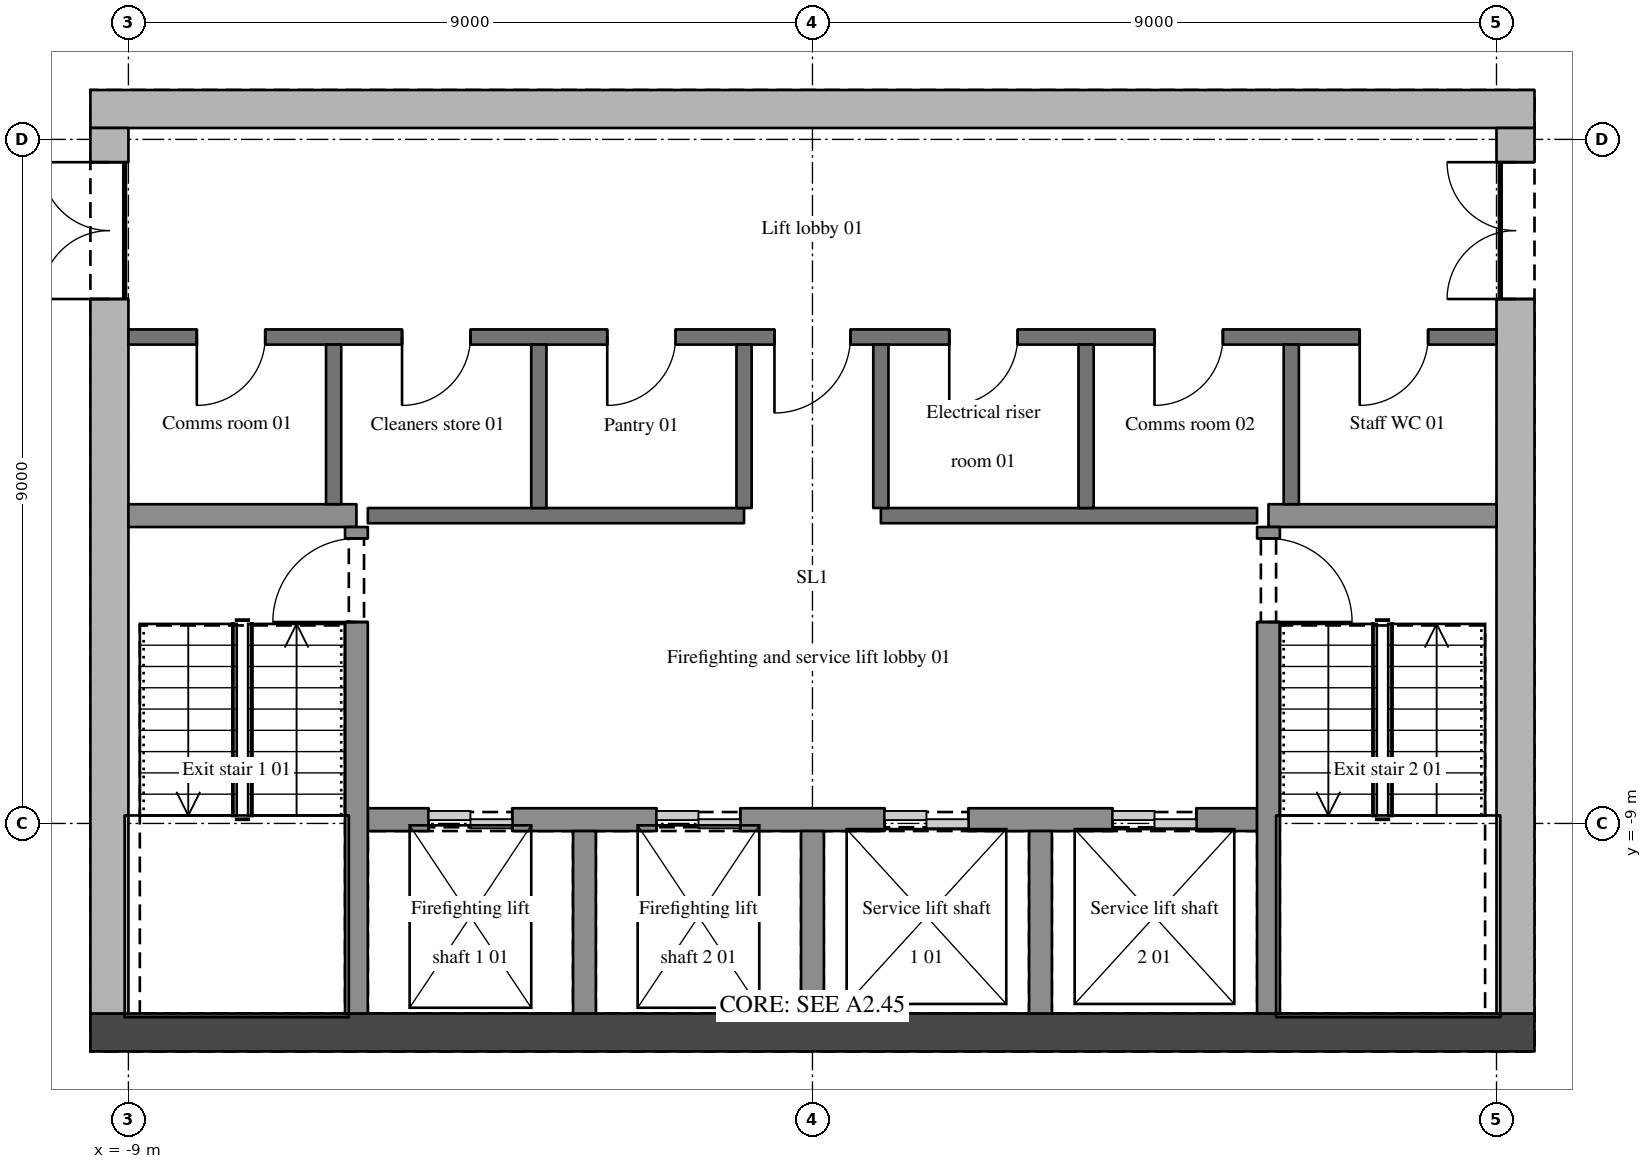
"""IFC4 building model, lengths in metres.
Left out: names, types, materials, properties, quantities, classifications, styles, units other than length and angle.
Written with IfcOpenShell. Run it as: python <this file> out.ifc"""

import sys

from ifc_helpers import new_model, si_unit, direction, frame, frame_2d, origin, place, context, subcontext, project, spatial, polyline, rectangle, outline, extrude, element, fill, save


model = new_model("IFC4")
c1 = context("Model", 3, precision=1e-05, world=origin(), true_north=direction((0.0, 1.0)))
c2 = subcontext(c1, "Body", "Model", "MODEL_VIEW")
j1 = project(units=[si_unit("LENGTHUNIT", "METRE"), si_unit("PLANEANGLEUNIT", "RADIAN")], contexts=[c1])
p1 = place(None, origin())
s1 = spatial("IfcSite", under=j1, at=p1, CompositionType="ELEMENT")
p2 = place(p1, origin())
s2 = spatial("IfcBuilding", under=s1, at=p2, CompositionType="ELEMENT")
p3 = place(p2, frame((0.0, 0.0, 300.9)))
s3 = spatial("IfcBuildingStorey", under=s2, at=p3, CompositionType="ELEMENT", Elevation=300.9)
for number, where, z_axis, x_axis in (
    (1, (-9.5, -11.75, 0.0), (0.0, 0.0, 1.0), (1.0, 0.0, 0.0)),
    (2, (-9.5, 0.4, 0.0), (0.0, 0.0, 1.0), (1.0, 0.0, 0.0)),
):
    element("IfcWall", number, at=place(p3, frame(where, z_axis=z_axis, x_axis=x_axis)), inside=s3, PredefinedType="SHEAR", context=c2, shape_type="SweptSolid", body=[
        extrude(outline(polyline([(0.0, 0.0), (19.0, 0.0), (19.0, 3.6), (0.0, 3.6), (0.0, 0.0)])), frame((0.0, 0.25, 0.0), z_axis=(0.0, -1.0, 0.0), x_axis=(1.0, 0.0, 0.0)), (0.0, 0.0, 1.0), 0.5),
    ])
p4 = place(p3, frame((-9.25, -11.5, 0.0), z_axis=(0.0, 0.0, 1.0), x_axis=(0.0, 1.0, 0.0)))
e3 = element("IfcWall", 3, at=p4, inside=s3, PredefinedType="SHEAR", context=c2, shape_type="SweptSolid", body=[
    extrude(outline(polyline([(0.0, 0.0), (11.65, 0.0), (11.65, 3.6), (0.0, 3.6), (0.0, 0.0)])), frame((0.0, 0.25, 0.0), z_axis=(0.0, -1.0, 0.0), x_axis=(1.0, 0.0, 0.0)), (0.0, 0.0, 1.0), 0.5),
])
p5 = place(p4, frame((9.4, 0.0, 0.0)))
e4 = element("IfcOpeningElement", 4, at=p5, cuts=e3, PredefinedType="OPENING", context=c2, shape_type="SweptSolid", body=[
    extrude(rectangle(XDim=1.8, YDim=2.1, at=frame_2d((0.9, 1.05))), frame((0.0, 0.26, 0.0), z_axis=(0.0, -1.0, 0.0), x_axis=(1.0, 0.0, 0.0)), (0.0, 0.0, 1.0), 0.52),
])
p6 = place(p3, frame((9.25, -11.5, 0.0), z_axis=(0.0, 0.0, 1.0), x_axis=(0.0, 1.0, 0.0)))
e5 = element("IfcWall", 5, at=p6, inside=s3, PredefinedType="SHEAR", context=c2, shape_type="SweptSolid", body=[
    extrude(outline(polyline([(0.0, 0.0), (11.65, 0.0), (11.65, 3.6), (0.0, 3.6), (0.0, 0.0)])), frame((0.0, 0.25, 0.0), z_axis=(0.0, -1.0, 0.0), x_axis=(1.0, 0.0, 0.0)), (0.0, 0.0, 1.0), 0.5),
])
p7 = place(p6, frame((9.4, 0.0, 0.0)))
e6 = element("IfcOpeningElement", 6, at=p7, cuts=e5, PredefinedType="OPENING", context=c2, shape_type="SweptSolid", body=[
    extrude(rectangle(XDim=1.8, YDim=2.1, at=frame_2d((0.9, 1.05))), frame((0.0, 0.26, 0.0), z_axis=(0.0, -1.0, 0.0), x_axis=(1.0, 0.0, 0.0)), (0.0, 0.0, 1.0), 0.52),
])
p8 = place(p3, frame((-5.85, -8.95, 0.0), z_axis=(0.0, 0.0, 1.0), x_axis=(1.0, 0.0, 0.0)))
e7 = element("IfcWall", 7, at=p8, inside=s3, PredefinedType="SHEAR", context=c2, shape_type="SweptSolid", body=[
    extrude(rectangle(XDim=11.7, YDim=0.3, at=frame_2d((5.85, 0.0))), origin(), (0.0, 0.0, 1.0), 3.6),
])
p9 = place(p8, frame((0.8, 0.0, 0.0)))
e8 = element("IfcOpeningElement", 8, at=p9, cuts=e7, PredefinedType="OPENING", context=c2, shape_type="SweptSolid", body=[
    extrude(rectangle(XDim=1.1, YDim=2.1, at=frame_2d((0.55, 1.05))), frame((0.0, 0.16, 0.0), z_axis=(0.0, -1.0, 0.0), x_axis=(1.0, 0.0, 0.0)), (0.0, 0.0, 1.0), 0.32),
])
p10 = place(p8, frame((3.8, 0.0, 0.0)))
e9 = element("IfcOpeningElement", 9, at=p10, cuts=e7, PredefinedType="OPENING", context=c2, shape_type="SweptSolid", body=[
    extrude(rectangle(XDim=1.1, YDim=2.1, at=frame_2d((0.55, 1.05))), frame((0.0, 0.16, 0.0), z_axis=(0.0, -1.0, 0.0), x_axis=(1.0, 0.0, 0.0)), (0.0, 0.0, 1.0), 0.32),
])
p11 = place(p8, frame((6.8, 0.0, 0.0)))
e10 = element("IfcOpeningElement", 10, at=p11, cuts=e7, PredefinedType="OPENING", context=c2, shape_type="SweptSolid", body=[
    extrude(rectangle(XDim=1.1, YDim=2.1, at=frame_2d((0.55, 1.05))), frame((0.0, 0.16, 0.0), z_axis=(0.0, -1.0, 0.0), x_axis=(1.0, 0.0, 0.0)), (0.0, 0.0, 1.0), 0.32),
])
p12 = place(p8, frame((9.8, 0.0, 0.0)))
e11 = element("IfcOpeningElement", 11, at=p12, cuts=e7, PredefinedType="OPENING", context=c2, shape_type="SweptSolid", body=[
    extrude(rectangle(XDim=1.1, YDim=2.1, at=frame_2d((0.55, 1.05))), frame((0.0, 0.16, 0.0), z_axis=(0.0, -1.0, 0.0), x_axis=(1.0, 0.0, 0.0)), (0.0, 0.0, 1.0), 0.32),
])
p13 = place(p3, frame((-9.0, -4.95, 0.0), z_axis=(0.0, 0.0, 1.0), x_axis=(1.0, 0.0, 0.0)))
e12 = element("IfcWall", 12, at=p13, inside=s3, PredefinedType="SHEAR", context=c2, shape_type="SweptSolid", body=[
    extrude(rectangle(XDim=3.0, YDim=0.3, at=frame_2d((1.5, 0.0))), origin(), (0.0, 0.0, 1.0), 3.6),
])
for number, where, z_axis, x_axis in (
    (13, (-5.85, -4.95, 0.0), (0.0, 0.0, 1.0), (1.0, 0.0, 0.0)),
    (14, (0.9, -4.95, 0.0), (0.0, 0.0, 1.0), (1.0, 0.0, 0.0)),
):
    element("IfcWall", number, at=place(p3, frame(where, z_axis=z_axis, x_axis=x_axis)), inside=s3, PredefinedType="SOLIDWALL", context=c2, shape_type="SweptSolid", body=[
        extrude(rectangle(XDim=4.95, YDim=0.2, at=frame_2d((2.475, 0.0))), origin(), (0.0, 0.0, 1.0), 3.3),
    ])
p14 = place(p3, frame((6.0, -4.95, 0.0), z_axis=(0.0, 0.0, 1.0), x_axis=(1.0, 0.0, 0.0)))
e15 = element("IfcWall", 15, at=p14, inside=s3, PredefinedType="SHEAR", context=c2, shape_type="SweptSolid", body=[
    extrude(rectangle(XDim=3.0, YDim=0.3, at=frame_2d((1.5, 0.0))), origin(), (0.0, 0.0, 1.0), 3.6),
])
p15 = place(p3, frame((9.0, -2.6, 0.0), z_axis=(0.0, 0.0, 1.0), x_axis=(-1.0, 0.0, 0.0)))
e16 = element("IfcWall", 16, at=p15, inside=s3, PredefinedType="SOLIDWALL", context=c2, shape_type="SweptSolid", body=[
    extrude(rectangle(XDim=18.0, YDim=0.2, at=frame_2d((9.0, 0.0))), origin(), (0.0, 0.0, 1.0), 3.3),
])
p16 = place(p15, frame((8.5, 0.0, 0.0)))
e17 = element("IfcOpeningElement", 17, at=p16, cuts=e16, PredefinedType="OPENING", context=c2, shape_type="SweptSolid", body=[
    extrude(rectangle(XDim=1.0, YDim=2.1, at=frame_2d((0.5, 1.05))), frame((0.0, 0.11, 0.0), z_axis=(0.0, -1.0, 0.0), x_axis=(1.0, 0.0, 0.0)), (0.0, 0.0, 1.0), 0.22),
])
p17 = place(p15, frame((16.2, 0.0, 0.0)))
e18 = element("IfcOpeningElement", 18, at=p17, cuts=e16, PredefinedType="OPENING", context=c2, shape_type="SweptSolid", body=[
    extrude(rectangle(XDim=0.9, YDim=2.1, at=frame_2d((0.45, 1.05))), frame((0.0, 0.11, 0.0), z_axis=(0.0, -1.0, 0.0), x_axis=(1.0, 0.0, 0.0)), (0.0, 0.0, 1.0), 0.22),
])
p18 = place(p15, frame((13.5, 0.0, 0.0)))
e19 = element("IfcOpeningElement", 19, at=p18, cuts=e16, PredefinedType="OPENING", context=c2, shape_type="SweptSolid", body=[
    extrude(rectangle(XDim=0.9, YDim=2.1, at=frame_2d((0.45, 1.05))), frame((0.0, 0.11, 0.0), z_axis=(0.0, -1.0, 0.0), x_axis=(1.0, 0.0, 0.0)), (0.0, 0.0, 1.0), 0.22),
])
p19 = place(p15, frame((10.8, 0.0, 0.0)))
e20 = element("IfcOpeningElement", 20, at=p19, cuts=e16, PredefinedType="OPENING", context=c2, shape_type="SweptSolid", body=[
    extrude(rectangle(XDim=0.9, YDim=2.1, at=frame_2d((0.45, 1.05))), frame((0.0, 0.11, 0.0), z_axis=(0.0, -1.0, 0.0), x_axis=(1.0, 0.0, 0.0)), (0.0, 0.0, 1.0), 0.22),
])
p20 = place(p15, frame((6.3, 0.0, 0.0)))
e21 = element("IfcOpeningElement", 21, at=p20, cuts=e16, PredefinedType="OPENING", context=c2, shape_type="SweptSolid", body=[
    extrude(rectangle(XDim=0.9, YDim=2.1, at=frame_2d((0.45, 1.05))), frame((0.0, 0.11, 0.0), z_axis=(0.0, -1.0, 0.0), x_axis=(1.0, 0.0, 0.0)), (0.0, 0.0, 1.0), 0.22),
])
p21 = place(p15, frame((3.6, 0.0, 0.0)))
e22 = element("IfcOpeningElement", 22, at=p21, cuts=e16, PredefinedType="OPENING", context=c2, shape_type="SweptSolid", body=[
    extrude(rectangle(XDim=0.9, YDim=2.1, at=frame_2d((0.45, 1.05))), frame((0.0, 0.11, 0.0), z_axis=(0.0, -1.0, 0.0), x_axis=(1.0, 0.0, 0.0)), (0.0, 0.0, 1.0), 0.22),
])
p22 = place(p15, frame((0.9, 0.0, 0.0)))
e23 = element("IfcOpeningElement", 23, at=p22, cuts=e16, PredefinedType="OPENING", context=c2, shape_type="SweptSolid", body=[
    extrude(rectangle(XDim=0.9, YDim=2.1, at=frame_2d((0.45, 1.05))), frame((0.0, 0.11, 0.0), z_axis=(0.0, -1.0, 0.0), x_axis=(1.0, 0.0, 0.0)), (0.0, 0.0, 1.0), 0.22),
])
p23 = place(p3, frame((-6.3, -4.8, 0.0), z_axis=(0.0, 0.0, 1.0), x_axis=(0.0, 1.0, 0.0)))
e24 = element("IfcWall", 24, at=p23, inside=s3, PredefinedType="SOLIDWALL", context=c2, shape_type="SweptSolid", body=[
    extrude(rectangle(XDim=2.1, YDim=0.2, at=frame_2d((1.05, 0.0))), origin(), (0.0, 0.0, 1.0), 3.3),
])
p24 = place(p3, frame((-6.0, -11.5, 0.0), z_axis=(0.0, 0.0, 1.0), x_axis=(0.0, 1.0, 0.0)))
e25 = element("IfcWall", 25, at=p24, inside=s3, PredefinedType="SHEAR", context=c2, shape_type="SweptSolid", body=[
    extrude(rectangle(XDim=6.4, YDim=0.3, at=frame_2d((3.2, 0.0))), origin(), (0.0, 0.0, 1.0), 3.6),
])
p25 = place(p24, frame((5.15, 0.0, 0.0)))
e26 = element("IfcOpeningElement", 26, at=p25, cuts=e25, PredefinedType="OPENING", context=c2, shape_type="SweptSolid", body=[
    extrude(rectangle(XDim=1.1, YDim=2.1, at=frame_2d((0.55, 1.05))), frame((0.0, 0.16, 0.0), z_axis=(0.0, -1.0, 0.0), x_axis=(1.0, 0.0, 0.0)), (0.0, 0.0, 1.0), 0.32),
])
p26 = place(p3, frame((-3.6, -4.85, 0.0), z_axis=(0.0, 0.0, 1.0), x_axis=(0.0, 1.0, 0.0)))
e27 = element("IfcWall", 27, at=p26, inside=s3, PredefinedType="SOLIDWALL", context=c2, shape_type="SweptSolid", body=[
    extrude(rectangle(XDim=2.15, YDim=0.2, at=frame_2d((1.075, 0.0))), origin(), (0.0, 0.0, 1.0), 3.3),
])
p27 = place(p3, frame((-3.0, -11.5, 0.0), z_axis=(0.0, 0.0, 1.0), x_axis=(0.0, 1.0, 0.0)))
e28 = element("IfcWall", 28, at=p27, inside=s3, PredefinedType="SHEAR", context=c2, shape_type="SweptSolid", body=[
    extrude(rectangle(XDim=2.4, YDim=0.3, at=frame_2d((1.2, 0.0))), origin(), (0.0, 0.0, 1.0), 3.6),
])
p28 = place(p3, frame((-0.9, -4.85, 0.0), z_axis=(0.0, 0.0, 1.0), x_axis=(0.0, 1.0, 0.0)))
e29 = element("IfcWall", 29, at=p28, inside=s3, PredefinedType="SOLIDWALL", context=c2, shape_type="SweptSolid", body=[
    extrude(rectangle(XDim=2.15, YDim=0.2, at=frame_2d((1.075, 0.0))), origin(), (0.0, 0.0, 1.0), 3.3),
])
p29 = place(p3, frame((0.0, -11.5, 0.0), z_axis=(0.0, 0.0, 1.0), x_axis=(0.0, 1.0, 0.0)))
e30 = element("IfcWall", 30, at=p29, inside=s3, PredefinedType="SHEAR", context=c2, shape_type="SweptSolid", body=[
    extrude(rectangle(XDim=2.4, YDim=0.3, at=frame_2d((1.2, 0.0))), origin(), (0.0, 0.0, 1.0), 3.6),
])
p30 = place(p3, frame((0.9, -4.85, 0.0), z_axis=(0.0, 0.0, 1.0), x_axis=(0.0, 1.0, 0.0)))
e31 = element("IfcWall", 31, at=p30, inside=s3, PredefinedType="SOLIDWALL", context=c2, shape_type="SweptSolid", body=[
    extrude(rectangle(XDim=2.15, YDim=0.2, at=frame_2d((1.075, 0.0))), origin(), (0.0, 0.0, 1.0), 3.3),
])
p31 = place(p3, frame((3.0, -11.5, 0.0), z_axis=(0.0, 0.0, 1.0), x_axis=(0.0, 1.0, 0.0)))
e32 = element("IfcWall", 32, at=p31, inside=s3, PredefinedType="SHEAR", context=c2, shape_type="SweptSolid", body=[
    extrude(rectangle(XDim=2.4, YDim=0.3, at=frame_2d((1.2, 0.0))), origin(), (0.0, 0.0, 1.0), 3.6),
])
p32 = place(p3, frame((3.6, -4.85, 0.0), z_axis=(0.0, 0.0, 1.0), x_axis=(0.0, 1.0, 0.0)))
e33 = element("IfcWall", 33, at=p32, inside=s3, PredefinedType="SOLIDWALL", context=c2, shape_type="SweptSolid", body=[
    extrude(rectangle(XDim=2.15, YDim=0.2, at=frame_2d((1.075, 0.0))), origin(), (0.0, 0.0, 1.0), 3.3),
])
p33 = place(p3, frame((6.0, -5.1, 0.0), z_axis=(0.0, 0.0, 1.0), x_axis=(0.0, -1.0, 0.0)))
e34 = element("IfcWall", 34, at=p33, inside=s3, PredefinedType="SHEAR", context=c2, shape_type="SweptSolid", body=[
    extrude(rectangle(XDim=6.4, YDim=0.3, at=frame_2d((3.2, 0.0))), origin(), (0.0, 0.0, 1.0), 3.6),
])
p34 = place(p33, frame((0.15, 0.0, 0.0)))
e35 = element("IfcOpeningElement", 35, at=p34, cuts=e34, PredefinedType="OPENING", context=c2, shape_type="SweptSolid", body=[
    extrude(rectangle(XDim=1.1, YDim=2.1, at=frame_2d((0.55, 1.05))), frame((0.0, 0.16, 0.0), z_axis=(0.0, -1.0, 0.0), x_axis=(1.0, 0.0, 0.0)), (0.0, 0.0, 1.0), 0.32),
])
p35 = place(p3, frame((6.3, -4.8, 0.0), z_axis=(0.0, 0.0, 1.0), x_axis=(0.0, 1.0, 0.0)))
e36 = element("IfcWall", 36, at=p35, inside=s3, PredefinedType="SOLIDWALL", context=c2, shape_type="SweptSolid", body=[
    extrude(rectangle(XDim=2.1, YDim=0.2, at=frame_2d((1.05, 0.0))), origin(), (0.0, 0.0, 1.0), 3.3),
])
p36 = place(p5, origin())
e37 = element("IfcDoor", 37, at=p36, inside=s3, OperationType="DOUBLE_DOOR_SINGLE_SWING", PredefinedType="DOOR", context=c2, shape_type="SweptSolid", body=[
    extrude(rectangle(XDim=1.8, YDim=2.1, at=frame_2d((0.9, 1.05))), frame((0.0, 0.025, 0.0), z_axis=(0.0, -1.0, 0.0), x_axis=(1.0, 0.0, 0.0)), (0.0, 0.0, 1.0), 0.05),
])
fill(e4, e37)
p37 = place(p7, origin())
e38 = element("IfcDoor", 38, at=p37, inside=s3, OperationType="DOUBLE_DOOR_SINGLE_SWING", PredefinedType="DOOR", context=c2, shape_type="SweptSolid", body=[
    extrude(rectangle(XDim=1.8, YDim=2.1, at=frame_2d((0.9, 1.05))), frame((0.0, 0.025, 0.0), z_axis=(0.0, -1.0, 0.0), x_axis=(1.0, 0.0, 0.0)), (0.0, 0.0, 1.0), 0.05),
])
fill(e6, e38)
p38 = place(p16, origin())
e39 = element("IfcDoor", 39, at=p38, inside=s3, OperationType="SINGLE_SWING_RIGHT", PredefinedType="DOOR", context=c2, shape_type="SweptSolid", body=[
    extrude(rectangle(XDim=1.0, YDim=2.1, at=frame_2d((0.5, 1.05))), frame((0.0, 0.025, 0.0), z_axis=(0.0, -1.0, 0.0), x_axis=(1.0, 0.0, 0.0)), (0.0, 0.0, 1.0), 0.05),
])
fill(e17, e39)
p39 = place(p25, origin())
e40 = element("IfcDoor", 40, at=p39, inside=s3, OperationType="SINGLE_SWING_LEFT", PredefinedType="DOOR", context=c2, shape_type="SweptSolid", body=[
    extrude(rectangle(XDim=1.1, YDim=2.1, at=frame_2d((0.55, 1.05))), frame((0.0, 0.025, 0.0), z_axis=(0.0, -1.0, 0.0), x_axis=(1.0, 0.0, 0.0)), (0.0, 0.0, 1.0), 0.05),
])
fill(e26, e40)
p40 = place(p34, origin())
e41 = element("IfcDoor", 41, at=p40, inside=s3, OperationType="SINGLE_SWING_RIGHT", PredefinedType="DOOR", context=c2, shape_type="SweptSolid", body=[
    extrude(rectangle(XDim=1.1, YDim=2.1, at=frame_2d((0.55, 1.05))), frame((0.0, 0.025, 0.0), z_axis=(0.0, -1.0, 0.0), x_axis=(1.0, 0.0, 0.0)), (0.0, 0.0, 1.0), 0.05),
])
fill(e35, e41)
p41 = place(p17, origin())
e42 = element("IfcDoor", 42, at=p41, inside=s3, OperationType="SINGLE_SWING_RIGHT", PredefinedType="DOOR", context=c2, shape_type="SweptSolid", body=[
    extrude(rectangle(XDim=0.9, YDim=2.1, at=frame_2d((0.45, 1.05))), frame((0.0, 0.025, 0.0), z_axis=(0.0, -1.0, 0.0), x_axis=(1.0, 0.0, 0.0)), (0.0, 0.0, 1.0), 0.05),
])
fill(e18, e42)
p42 = place(p18, origin())
e43 = element("IfcDoor", 43, at=p42, inside=s3, OperationType="SINGLE_SWING_RIGHT", PredefinedType="DOOR", context=c2, shape_type="SweptSolid", body=[
    extrude(rectangle(XDim=0.9, YDim=2.1, at=frame_2d((0.45, 1.05))), frame((0.0, 0.025, 0.0), z_axis=(0.0, -1.0, 0.0), x_axis=(1.0, 0.0, 0.0)), (0.0, 0.0, 1.0), 0.05),
])
fill(e19, e43)
p43 = place(p19, origin())
e44 = element("IfcDoor", 44, at=p43, inside=s3, OperationType="SINGLE_SWING_RIGHT", PredefinedType="DOOR", context=c2, shape_type="SweptSolid", body=[
    extrude(rectangle(XDim=0.9, YDim=2.1, at=frame_2d((0.45, 1.05))), frame((0.0, 0.025, 0.0), z_axis=(0.0, -1.0, 0.0), x_axis=(1.0, 0.0, 0.0)), (0.0, 0.0, 1.0), 0.05),
])
fill(e20, e44)
p44 = place(p20, origin())
e45 = element("IfcDoor", 45, at=p44, inside=s3, OperationType="SINGLE_SWING_RIGHT", PredefinedType="DOOR", context=c2, shape_type="SweptSolid", body=[
    extrude(rectangle(XDim=0.9, YDim=2.1, at=frame_2d((0.45, 1.05))), frame((0.0, 0.025, 0.0), z_axis=(0.0, -1.0, 0.0), x_axis=(1.0, 0.0, 0.0)), (0.0, 0.0, 1.0), 0.05),
])
fill(e21, e45)
p45 = place(p21, origin())
e46 = element("IfcDoor", 46, at=p45, inside=s3, OperationType="SINGLE_SWING_RIGHT", PredefinedType="DOOR", context=c2, shape_type="SweptSolid", body=[
    extrude(rectangle(XDim=0.9, YDim=2.1, at=frame_2d((0.45, 1.05))), frame((0.0, 0.025, 0.0), z_axis=(0.0, -1.0, 0.0), x_axis=(1.0, 0.0, 0.0)), (0.0, 0.0, 1.0), 0.05),
])
fill(e22, e46)
p46 = place(p22, origin())
e47 = element("IfcDoor", 47, at=p46, inside=s3, OperationType="SINGLE_SWING_RIGHT", PredefinedType="DOOR", context=c2, shape_type="SweptSolid", body=[
    extrude(rectangle(XDim=0.9, YDim=2.1, at=frame_2d((0.45, 1.05))), frame((0.0, 0.025, 0.0), z_axis=(0.0, -1.0, 0.0), x_axis=(1.0, 0.0, 0.0)), (0.0, 0.0, 1.0), 0.05),
])
fill(e23, e47)
p47 = place(p9, origin())
e48 = element("IfcDoor", 48, at=p47, inside=s3, OperationType="DOUBLE_DOOR_SLIDING", PredefinedType="DOOR", context=c2, shape_type="SweptSolid", body=[
    extrude(rectangle(XDim=1.1, YDim=2.1, at=frame_2d((0.55, 1.05))), frame((0.0, 0.025, 0.0), z_axis=(0.0, -1.0, 0.0), x_axis=(1.0, 0.0, 0.0)), (0.0, 0.0, 1.0), 0.05),
])
fill(e8, e48)
p48 = place(p10, origin())
e49 = element("IfcDoor", 49, at=p48, inside=s3, OperationType="DOUBLE_DOOR_SLIDING", PredefinedType="DOOR", context=c2, shape_type="SweptSolid", body=[
    extrude(rectangle(XDim=1.1, YDim=2.1, at=frame_2d((0.55, 1.05))), frame((0.0, 0.025, 0.0), z_axis=(0.0, -1.0, 0.0), x_axis=(1.0, 0.0, 0.0)), (0.0, 0.0, 1.0), 0.05),
])
fill(e9, e49)
p49 = place(p11, origin())
e50 = element("IfcDoor", 50, at=p49, inside=s3, OperationType="DOUBLE_DOOR_SLIDING", PredefinedType="DOOR", context=c2, shape_type="SweptSolid", body=[
    extrude(rectangle(XDim=1.1, YDim=2.1, at=frame_2d((0.55, 1.05))), frame((0.0, 0.025, 0.0), z_axis=(0.0, -1.0, 0.0), x_axis=(1.0, 0.0, 0.0)), (0.0, 0.0, 1.0), 0.05),
])
fill(e10, e50)
p50 = place(p12, origin())
e51 = element("IfcDoor", 51, at=p50, inside=s3, OperationType="DOUBLE_DOOR_SLIDING", PredefinedType="DOOR", context=c2, shape_type="SweptSolid", body=[
    extrude(rectangle(XDim=1.1, YDim=2.1, at=frame_2d((0.55, 1.05))), frame((0.0, 0.025, 0.0), z_axis=(0.0, -1.0, 0.0), x_axis=(1.0, 0.0, 0.0)), (0.0, 0.0, 1.0), 0.05),
])
fill(e11, e51)
save(model, sys.argv[1])
